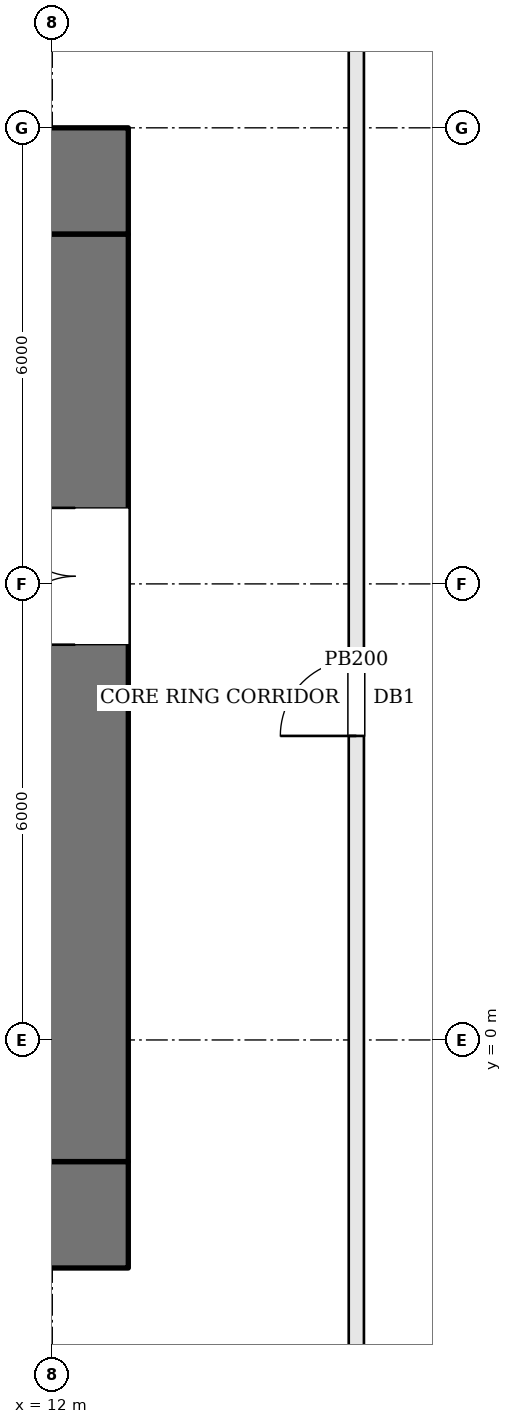
"""IFC4 building model, lengths in metres.
Left out: names, types, materials, properties, quantities, classifications, styles, units other than length and angle.
Written with IfcOpenShell. Run it as: python <this file> out.ifc"""

import sys

from ifc_helpers import new_model, si_unit, direction, frame, frame_2d, origin, place, context, subcontext, project, spatial, rectangle, extrude, element, fill, save


model = new_model("IFC4")
c1 = context("Model", 3, precision=1e-05, world=origin(), true_north=direction((0.0, 1.0)))
c2 = subcontext(c1, "Body", "Model", "MODEL_VIEW")
j1 = project(units=[si_unit("LENGTHUNIT", "METRE"), si_unit("PLANEANGLEUNIT", "RADIAN")], contexts=[c1])
p1 = place(None, origin())
s1 = spatial("IfcSite", under=j1, at=p1, CompositionType="ELEMENT")
p2 = place(p1, origin())
s2 = spatial("IfcBuilding", under=s1, at=p2, CompositionType="ELEMENT")
p3 = place(p2, frame((0.0, 0.0, 7.2)))
s3 = spatial("IfcBuildingStorey", under=s2, at=p3, CompositionType="ELEMENT", Elevation=7.2)
p4 = place(p3, frame((-13.0, 11.3, 0.0), z_axis=(0.0, 0.0, 1.0), x_axis=(1.0, 0.0, 0.0)))
e1 = element("IfcWall", 1, at=p4, inside=s3, PredefinedType="SHEAR", context=c2, shape_type="SweptSolid", body=[
    extrude(rectangle(XDim=26.0, YDim=1.4, at=frame_2d((13.0, 0.0))), origin(), (0.0, 0.0, 1.0), 7.8),
])
p5 = place(p4, frame((9.375, 0.0, 0.0)))
e2 = element("IfcOpeningElement", 2, at=p5, cuts=e1, PredefinedType="OPENING", context=c2, shape_type="SweptSolid", body=[
    extrude(rectangle(XDim=0.7, YDim=2.1, at=frame_2d((0.35, 1.05))), frame((0.0, 0.71, 0.0), z_axis=(0.0, -1.0, 0.0), x_axis=(1.0, 0.0, 0.0)), (0.0, 0.0, 1.0), 1.42),
])
p6 = place(p4, frame((11.825, 0.0, 0.0)))
e3 = element("IfcOpeningElement", 3, at=p6, cuts=e1, PredefinedType="OPENING", context=c2, shape_type="SweptSolid", body=[
    extrude(rectangle(XDim=0.7, YDim=2.1, at=frame_2d((0.35, 1.05))), frame((0.0, 0.71, 0.0), z_axis=(0.0, -1.0, 0.0), x_axis=(1.0, 0.0, 0.0)), (0.0, 0.0, 1.0), 1.42),
])
p7 = place(p4, frame((13.725, 0.0, 0.0)))
e4 = element("IfcOpeningElement", 4, at=p7, cuts=e1, PredefinedType="OPENING", context=c2, shape_type="SweptSolid", body=[
    extrude(rectangle(XDim=1.0, YDim=2.1, at=frame_2d((0.5, 1.05))), frame((0.0, 0.71, 0.0), z_axis=(0.0, -1.0, 0.0), x_axis=(1.0, 0.0, 0.0)), (0.0, 0.0, 1.0), 1.42),
])
p8 = place(p4, frame((16.175, 0.0, 0.0)))
e5 = element("IfcOpeningElement", 5, at=p8, cuts=e1, PredefinedType="OPENING", context=c2, shape_type="SweptSolid", body=[
    extrude(rectangle(XDim=1.0, YDim=2.1, at=frame_2d((0.5, 1.05))), frame((0.0, 0.71, 0.0), z_axis=(0.0, -1.0, 0.0), x_axis=(1.0, 0.0, 0.0)), (0.0, 0.0, 1.0), 1.42),
])
p9 = place(p3, frame((-13.0, -2.3, 0.0), z_axis=(0.0, 0.0, 1.0), x_axis=(1.0, 0.0, 0.0)))
e6 = element("IfcWall", 6, at=p9, inside=s3, PredefinedType="SHEAR", context=c2, shape_type="SweptSolid", body=[
    extrude(rectangle(XDim=26.0, YDim=1.4, at=frame_2d((13.0, 0.0))), origin(), (0.0, 0.0, 1.0), 7.8),
])
p10 = place(p9, frame((9.55, 0.0, 0.0)))
e7 = element("IfcOpeningElement", 7, at=p10, cuts=e6, PredefinedType="OPENING", context=c2, shape_type="SweptSolid", body=[
    extrude(rectangle(XDim=0.9, YDim=2.1, at=frame_2d((0.45, 1.05))), frame((0.0, 0.71, 0.0), z_axis=(0.0, -1.0, 0.0), x_axis=(1.0, 0.0, 0.0)), (0.0, 0.0, 1.0), 1.42),
])
p11 = place(p9, frame((12.8, 0.0, 0.0)))
e8 = element("IfcOpeningElement", 8, at=p11, cuts=e6, PredefinedType="OPENING", context=c2, shape_type="SweptSolid", body=[
    extrude(rectangle(XDim=0.9, YDim=2.1, at=frame_2d((0.45, 1.05))), frame((0.0, 0.71, 0.0), z_axis=(0.0, -1.0, 0.0), x_axis=(1.0, 0.0, 0.0)), (0.0, 0.0, 1.0), 1.42),
])
p12 = place(p9, frame((15.0, 0.0, 0.0)))
e9 = element("IfcOpeningElement", 9, at=p12, cuts=e6, PredefinedType="OPENING", context=c2, shape_type="SweptSolid", body=[
    extrude(rectangle(XDim=1.0, YDim=2.1, at=frame_2d((0.5, 1.05))), frame((0.0, 0.71, 0.0), z_axis=(0.0, -1.0, 0.0), x_axis=(1.0, 0.0, 0.0)), (0.0, 0.0, 1.0), 1.42),
])
p13 = place(p9, frame((16.7, 0.0, 0.0)))
e10 = element("IfcOpeningElement", 10, at=p13, cuts=e6, PredefinedType="OPENING", context=c2, shape_type="SweptSolid", body=[
    extrude(rectangle(XDim=0.9, YDim=2.1, at=frame_2d((0.45, 1.05))), frame((0.0, 0.71, 0.0), z_axis=(0.0, -1.0, 0.0), x_axis=(1.0, 0.0, 0.0)), (0.0, 0.0, 1.0), 1.42),
])
p14 = place(p3, frame((12.3, -1.6, 0.0), z_axis=(0.0, 0.0, 1.0), x_axis=(0.0, 1.0, 0.0)))
e11 = element("IfcWall", 11, at=p14, inside=s3, PredefinedType="SHEAR", context=c2, shape_type="SweptSolid", body=[
    extrude(rectangle(XDim=12.2, YDim=1.4, at=frame_2d((6.1, 0.0))), origin(), (0.0, 0.0, 1.0), 7.8),
])
p15 = place(p14, frame((6.8, 0.0, 0.0)))
e12 = element("IfcOpeningElement", 12, at=p15, cuts=e11, PredefinedType="OPENING", context=c2, shape_type="SweptSolid", body=[
    extrude(rectangle(XDim=1.8, YDim=2.1, at=frame_2d((0.9, 1.05))), frame((0.0, 0.71, 0.0), z_axis=(0.0, -1.0, 0.0), x_axis=(1.0, 0.0, 0.0)), (0.0, 0.0, 1.0), 1.42),
])
p16 = place(p3, frame((16.0, -5.9, 0.0), z_axis=(0.0, 0.0, 1.0), x_axis=(0.0, 1.0, 0.0)))
e13 = element("IfcWall", 13, at=p16, inside=s3, PredefinedType="PARTITIONING", context=c2, shape_type="SweptSolid", body=[
    extrude(rectangle(XDim=21.792, YDim=0.2, at=frame_2d((10.896, 0.0))), origin(), (0.0, 0.0, 1.0), 6.83),
])
p17 = place(p16, frame((9.9, 0.0, 0.0)))
e14 = element("IfcOpeningElement", 14, at=p17, cuts=e13, PredefinedType="OPENING", context=c2, shape_type="SweptSolid", body=[
    extrude(rectangle(XDim=1.0, YDim=2.1, at=frame_2d((0.5, 1.05))), frame((0.0, 0.11, 0.0), z_axis=(0.0, -1.0, 0.0), x_axis=(1.0, 0.0, 0.0)), (0.0, 0.0, 1.0), 0.22),
])
p18 = place(p15, origin())
e15 = element("IfcDoor", 15, at=p18, inside=s3, OperationType="DOUBLE_DOOR_SINGLE_SWING", PredefinedType="DOOR", context=c2, shape_type="SweptSolid", body=[
    extrude(rectangle(XDim=1.8, YDim=2.1, at=frame_2d((0.9, 1.05))), frame((0.0, 0.025, 0.0), z_axis=(0.0, -1.0, 0.0), x_axis=(1.0, 0.0, 0.0)), (0.0, 0.0, 1.0), 0.05),
])
fill(e12, e15)
p19 = place(p17, origin())
e16 = element("IfcDoor", 16, at=p19, inside=s3, OperationType="SINGLE_SWING_LEFT", PredefinedType="DOOR", context=c2, shape_type="SweptSolid", body=[
    extrude(rectangle(XDim=1.0, YDim=2.1, at=frame_2d((0.5, 1.05))), frame((0.0, 0.025, 0.0), z_axis=(0.0, -1.0, 0.0), x_axis=(1.0, 0.0, 0.0)), (0.0, 0.0, 1.0), 0.05),
])
fill(e14, e16)
save(model, sys.argv[1])
